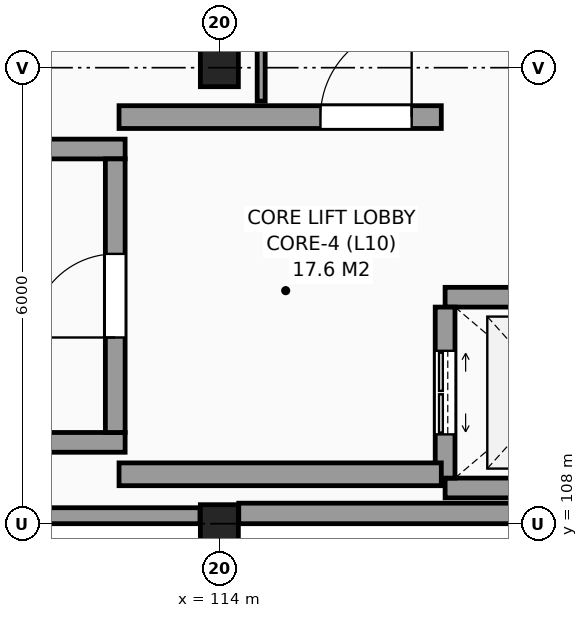
"""IFC4 building model, lengths in metres.
Left out: names, types, materials, properties, quantities, classifications, styles, units other than length and angle.
Written with IfcOpenShell. Run it as: python <this file> out.ifc"""

import sys

from ifc_helpers import new_model, si_unit, direction, frame, frame_2d, origin, origin_2d, place, context, subcontext, project, spatial, rectangle, extrude, element, fill, save


model = new_model("IFC4")
c1 = context("Model", 3, precision=1e-05, world=origin(), true_north=direction((0.0, 1.0)))
c2 = subcontext(c1, "Body", "Model", "MODEL_VIEW")
j1 = project(units=[si_unit("LENGTHUNIT", "METRE"), si_unit("PLANEANGLEUNIT", "RADIAN")], contexts=[c1])
p1 = place(None, origin())
s1 = spatial("IfcSite", under=j1, at=p1, CompositionType="ELEMENT")
p2 = place(p1, origin())
s2 = spatial("IfcBuilding", under=s1, at=p2, CompositionType="ELEMENT")
p3 = place(p2, frame((0.0, 0.0, 41.4)))
s3 = spatial("IfcBuildingStorey", under=s2, at=p3, CompositionType="ELEMENT", Elevation=41.4)
for number, where, z_axis, x_axis in (
    (1, (114.0, 108.0, 0.0), (0.0, 0.0, 1.0), (1.0, 0.0, 0.0)),
    (2, (114.0, 114.0, 0.0), (0.0, 0.0, 1.0), (1.0, 0.0, 0.0)),
):
    element("IfcColumn", number, at=place(p3, frame(where, z_axis=z_axis, x_axis=x_axis)), inside=s3, PredefinedType="COLUMN", context=c2, shape_type="SweptSolid", body=[
        extrude(rectangle(XDim=0.5, YDim=0.5, at=origin_2d()), origin(), (0.0, 0.0, 1.0), 3.3),
    ])
p4 = place(p3, frame((108.255, 108.105, 0.0), z_axis=(0.0, 0.0, 1.0), x_axis=(1.0, 0.0, 0.0)))
e3 = element("IfcWall", 3, at=p4, inside=s3, PredefinedType="SOLIDWALL", context=c2, shape_type="SweptSolid", body=[
    extrude(rectangle(XDim=5.49, YDim=0.21, at=frame_2d((2.745, 0.0))), origin(), (0.0, 0.0, 1.0), 2.41),
])
p5 = place(p3, frame((114.255, 108.135, 0.0), z_axis=(0.0, 0.0, 1.0), x_axis=(1.0, 0.0, 0.0)))
e4 = element("IfcWall", 4, at=p5, inside=s3, PredefinedType="SOLIDWALL", context=c2, shape_type="SweptSolid", body=[
    extrude(rectangle(XDim=5.49, YDim=0.27, at=frame_2d((2.745, 0.0))), origin(), (0.0, 0.0, 1.0), 2.41),
])
for number, where, z_axis, x_axis in (
    (5, (102.04, 109.07, 0.0), (0.0, 0.0, 1.0), (1.0, 0.0, 0.0)),
    (6, (102.04, 112.93, 0.0), (0.0, 0.0, 1.0), (1.0, 0.0, 0.0)),
):
    element("IfcWall", number, at=place(p3, frame(where, z_axis=z_axis, x_axis=x_axis)), inside=s3, PredefinedType="SHEAR", context=c2, shape_type="SweptSolid", body=[
        extrude(rectangle(XDim=10.72, YDim=0.26, at=frame_2d((5.36, 0.0))), origin(), (0.0, 0.0, 1.0), 3.3),
    ])
p6 = place(p3, frame((112.63, 109.2, 0.0), z_axis=(0.0, 0.0, 1.0), x_axis=(0.0, 1.0, 0.0)))
e7 = element("IfcWall", 7, at=p6, inside=s3, PredefinedType="SHEAR", context=c2, shape_type="SweptSolid", body=[
    extrude(rectangle(XDim=3.6, YDim=0.26, at=frame_2d((1.8, 0.0))), origin(), (0.0, 0.0, 1.0), 3.3),
])
p7 = place(p6, frame((1.25, 0.0, 0.0)))
e8 = element("IfcOpeningElement", 8, at=p7, cuts=e7, PredefinedType="OPENING", context=c2, shape_type="SweptSolid", body=[
    extrude(rectangle(XDim=1.1, YDim=2.15, at=frame_2d((0.55, 1.075))), frame((0.0, 0.14, 0.0), z_axis=(0.0, -1.0, 0.0), x_axis=(1.0, 0.0, 0.0)), (0.0, 0.0, 1.0), 0.28),
])
for number, where, z_axis, x_axis in (
    (9, (116.97, 108.47, 0.0), (0.0, 0.0, 1.0), (1.0, 0.0, 0.0)),
    (10, (116.97, 110.98, 0.0), (0.0, 0.0, 1.0), (1.0, 0.0, 0.0)),
):
    element("IfcWall", number, at=place(p3, frame(where, z_axis=z_axis, x_axis=x_axis)), inside=s3, PredefinedType="SHEAR", context=c2, shape_type="SweptSolid", body=[
        extrude(rectangle(XDim=2.91, YDim=0.26, at=frame_2d((1.455, 0.0))), origin(), (0.0, 0.0, 1.0), 3.3),
    ])
p8 = place(p3, frame((116.97, 108.6, 0.0), z_axis=(0.0, 0.0, 1.0), x_axis=(0.0, 1.0, 0.0)))
e11 = element("IfcWall", 11, at=p8, inside=s3, PredefinedType="SHEAR", context=c2, shape_type="SweptSolid", body=[
    extrude(rectangle(XDim=2.25, YDim=0.26, at=frame_2d((1.125, 0.0))), origin(), (0.0, 0.0, 1.0), 3.3),
])
p9 = place(p8, frame((0.575, 0.0, 0.0)))
e12 = element("IfcOpeningElement", 12, at=p9, cuts=e11, PredefinedType="OPENING", context=c2, shape_type="SweptSolid", body=[
    extrude(rectangle(XDim=1.1, YDim=2.2, at=frame_2d((0.55, 1.1))), frame((0.0, 0.14, 0.0), z_axis=(0.0, -1.0, 0.0), x_axis=(1.0, 0.0, 0.0)), (0.0, 0.0, 1.0), 0.28),
])
p10 = place(p3, frame((112.68, 113.35, 0.0), z_axis=(0.0, 0.0, 1.0), x_axis=(1.0, 0.0, 0.0)))
e13 = element("IfcWall", 13, at=p10, inside=s3, PredefinedType="SHEAR", context=c2, shape_type="SweptSolid", body=[
    extrude(rectangle(XDim=4.24, YDim=0.3, at=frame_2d((2.12, 0.0))), origin(), (0.0, 0.0, 1.0), 3.3),
])
p11 = place(p10, frame((2.65, 0.0, 0.0)))
e14 = element("IfcOpeningElement", 14, at=p11, cuts=e13, PredefinedType="OPENING", context=c2, shape_type="SweptSolid", body=[
    extrude(rectangle(XDim=1.2, YDim=2.2, at=frame_2d((0.6, 1.1))), frame((0.0, 0.16, 0.0), z_axis=(0.0, -1.0, 0.0), x_axis=(1.0, 0.0, 0.0)), (0.0, 0.0, 1.0), 0.32),
])
p12 = place(p3, frame((112.68, 108.65, 0.0), z_axis=(0.0, 0.0, 1.0), x_axis=(1.0, 0.0, 0.0)))
e15 = element("IfcWall", 15, at=p12, inside=s3, PredefinedType="SHEAR", context=c2, shape_type="SweptSolid", body=[
    extrude(rectangle(XDim=4.24, YDim=0.3, at=frame_2d((2.12, 0.0))), origin(), (0.0, 0.0, 1.0), 3.3),
])
p13 = place(p3, frame((114.55, 113.56, 0.0), z_axis=(0.0, 0.0, 1.0), x_axis=(0.0, 1.0, 0.0)))
e16 = element("IfcWall", 16, at=p13, inside=s3, PredefinedType="PARTITIONING", context=c2, shape_type="SweptSolid", body=[
    extrude(rectangle(XDim=2.24, YDim=0.105, at=frame_2d((1.12, 0.0))), origin(), (0.0, 0.0, 1.0), 3.06),
])
p14 = place(p7, origin())
e17 = element("IfcDoor", 17, at=p14, inside=s3, OperationType="SINGLE_SWING_LEFT", PredefinedType="DOOR", context=c2, shape_type="SweptSolid", body=[
    extrude(rectangle(XDim=1.1, YDim=2.15, at=frame_2d((0.55, 1.075))), frame((0.0, 0.025, 0.0), z_axis=(0.0, -1.0, 0.0), x_axis=(1.0, 0.0, 0.0)), (0.0, 0.0, 1.0), 0.05),
])
fill(e8, e17)
p15 = place(p9, origin())
e18 = element("IfcDoor", 18, at=p15, inside=s3, OperationType="DOUBLE_DOOR_SLIDING", PredefinedType="DOOR", context=c2, shape_type="SweptSolid", body=[
    extrude(rectangle(XDim=1.1, YDim=2.2, at=frame_2d((0.55, 1.1))), frame((0.0, 0.025, 0.0), z_axis=(0.0, -1.0, 0.0), x_axis=(1.0, 0.0, 0.0)), (0.0, 0.0, 1.0), 0.05),
])
fill(e12, e18)
p16 = place(p11, origin())
e19 = element("IfcDoor", 19, at=p16, inside=s3, OperationType="SINGLE_SWING_RIGHT", PredefinedType="DOOR", context=c2, shape_type="SweptSolid", body=[
    extrude(rectangle(XDim=1.2, YDim=2.2, at=frame_2d((0.6, 1.1))), frame((0.0, 0.025, 0.0), z_axis=(0.0, -1.0, 0.0), x_axis=(1.0, 0.0, 0.0)), (0.0, 0.0, 1.0), 0.05),
])
fill(e14, e19)
save(model, sys.argv[1])
